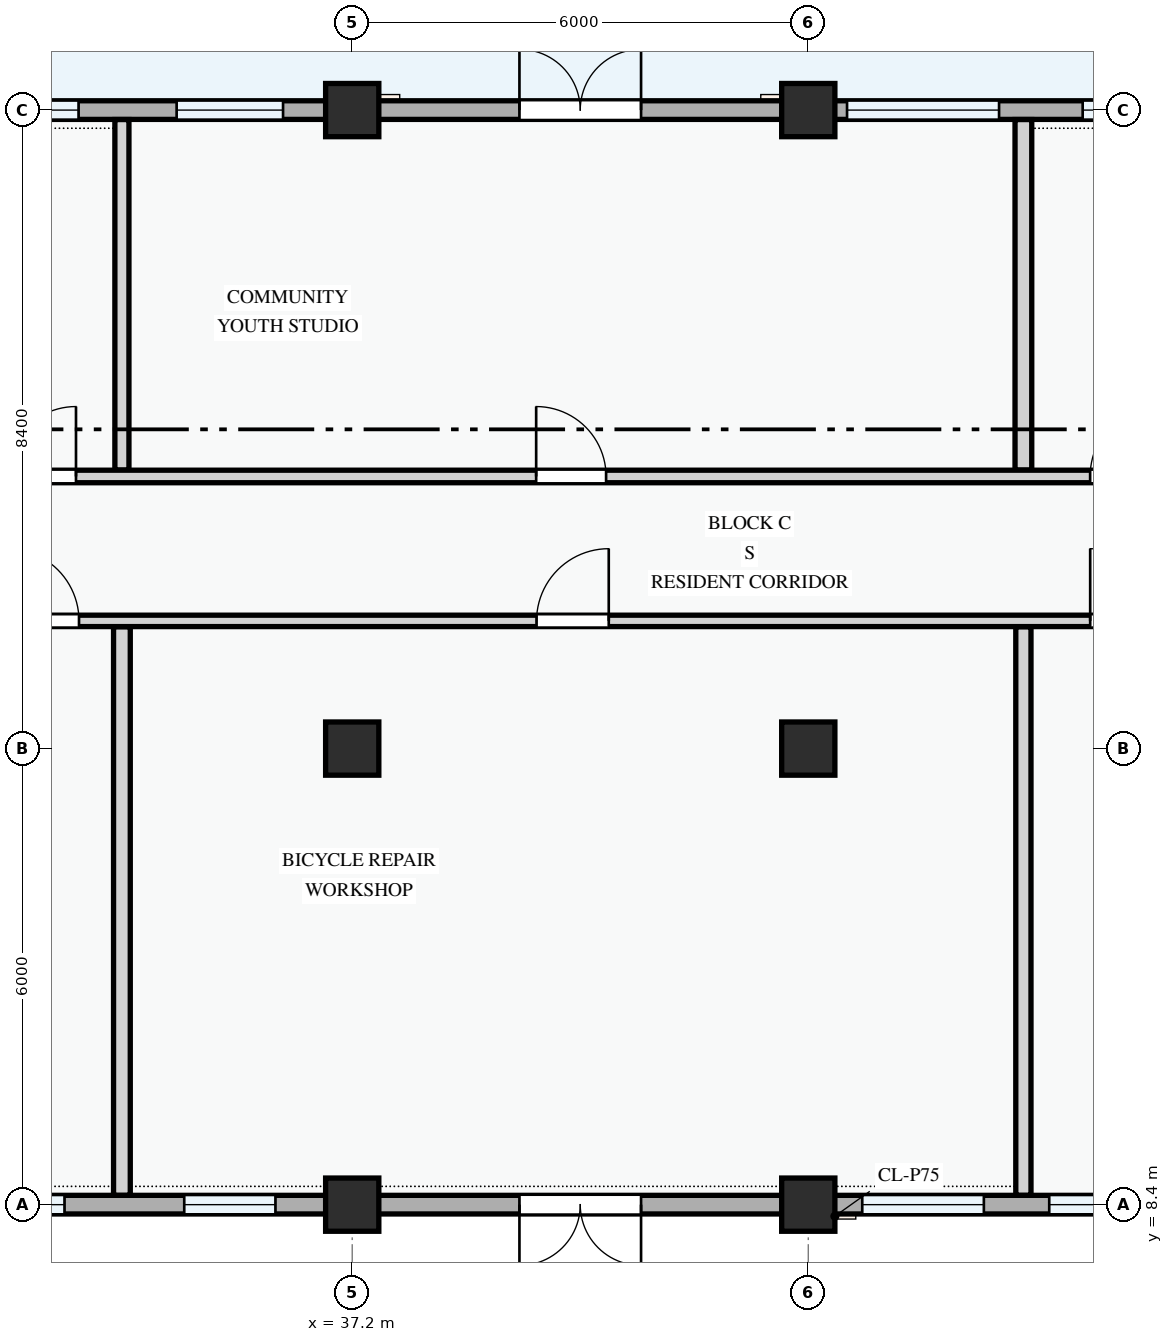
"""IFC4 building model, lengths in metres.
Left out: names, types, materials, properties, quantities, classifications, styles, units other than length and angle.
Written with IfcOpenShell. Run it as: python <this file> out.ifc"""

import sys

from ifc_helpers import new_model, si_unit, direction, frame, frame_2d, origin, origin_2d, place, context, subcontext, project, spatial, rectangle, extrude, element, fill, save


model = new_model("IFC4")
c1 = context("Model", 3, precision=1e-05, world=origin(), true_north=direction((0.0, 1.0)))
c2 = subcontext(c1, "Body", "Model", "MODEL_VIEW")
j1 = project(units=[si_unit("LENGTHUNIT", "METRE"), si_unit("PLANEANGLEUNIT", "RADIAN")], contexts=[c1])
p1 = place(None, origin())
s1 = spatial("IfcSite", under=j1, at=p1, CompositionType="ELEMENT")
p2 = place(p1, origin())
s2 = spatial("IfcBuilding", under=s1, at=p2, CompositionType="ELEMENT")
p3 = place(p2, origin())
s3 = spatial("IfcBuildingStorey", under=s2, at=p3, CompositionType="ELEMENT", Elevation=0.0)
for number, where, z_axis, x_axis in (
    (1, (37.2, 8.4, 0.0), (0.0, 0.0, 1.0), (1.0, 0.0, 0.0)),
    (2, (37.2, 14.4, 0.0), (0.0, 0.0, 1.0), (1.0, 0.0, 0.0)),
    (3, (37.2, 22.8, 0.0), (0.0, 0.0, 1.0), (1.0, 0.0, 0.0)),
    (4, (43.2, 8.4, 0.0), (0.0, 0.0, 1.0), (1.0, 0.0, 0.0)),
    (5, (43.2, 14.4, 0.0), (0.0, 0.0, 1.0), (1.0, 0.0, 0.0)),
    (6, (43.2, 22.8, 0.0), (0.0, 0.0, 1.0), (1.0, 0.0, 0.0)),
):
    element("IfcColumn", number, at=place(p3, frame(where, z_axis=z_axis, x_axis=x_axis)), inside=s3, PredefinedType="COLUMN", context=c2, shape_type="SweptSolid", body=[
        extrude(rectangle(XDim=0.7, YDim=0.7, at=origin_2d()), origin(), (0.0, 0.0, 1.0), 4.5),
    ])
p4 = place(p3, frame((28.8, 8.4, 0.0), z_axis=(0.0, 0.0, 1.0), x_axis=(1.0, 0.0, 0.0)))
e7 = element("IfcWall", 7, at=p4, inside=s3, PredefinedType="STANDARD", context=c2, shape_type="SweptSolid", body=[
    extrude(rectangle(XDim=8.4, YDim=0.245, at=frame_2d((4.2, 0.0))), origin(), (0.0, 0.0, 1.0), 3.485),
])
p5 = place(p4, frame((0.52, 0.0, 0.78)))
e8 = element("IfcOpeningElement", 8, at=p5, cuts=e7, PredefinedType="OPENING", context=c2, shape_type="SweptSolid", body=[
    extrude(rectangle(XDim=2.0, YDim=1.5, at=frame_2d((1.0, 0.75))), frame((0.0, 0.133, 0.0), z_axis=(0.0, -1.0, 0.0), x_axis=(1.0, 0.0, 0.0)), (0.0, 0.0, 1.0), 0.265),
])
p6 = place(p4, frame((3.465, 0.0, 0.78)))
e9 = element("IfcOpeningElement", 9, at=p6, cuts=e7, PredefinedType="OPENING", context=c2, shape_type="SweptSolid", body=[
    extrude(rectangle(XDim=1.15, YDim=1.25, at=frame_2d((0.575, 0.625))), frame((0.0, 0.133, 0.0), z_axis=(0.0, -1.0, 0.0), x_axis=(1.0, 0.0, 0.0)), (0.0, 0.0, 1.0), 0.265),
])
p7 = place(p4, frame((6.19, 0.0, 0.78)))
e10 = element("IfcOpeningElement", 10, at=p7, cuts=e7, PredefinedType="OPENING", context=c2, shape_type="SweptSolid", body=[
    extrude(rectangle(XDim=1.2, YDim=1.35, at=frame_2d((0.6, 0.675))), frame((0.0, 0.133, 0.0), z_axis=(0.0, -1.0, 0.0), x_axis=(1.0, 0.0, 0.0)), (0.0, 0.0, 1.0), 0.265),
])
p8 = place(p3, frame((37.2, 8.4, 0.0), z_axis=(0.0, 0.0, 1.0), x_axis=(1.0, 0.0, 0.0)))
e11 = element("IfcWall", 11, at=p8, inside=s3, PredefinedType="STANDARD", context=c2, shape_type="SweptSolid", body=[
    extrude(rectangle(XDim=6.0, YDim=0.245, at=frame_2d((3.0, 0.0))), origin(), (0.0, 0.0, 1.0), 3.585),
])
p9 = place(p8, frame((2.2, 0.0, 0.0)))
e12 = element("IfcOpeningElement", 12, at=p9, cuts=e11, PredefinedType="OPENING", context=c2, shape_type="SweptSolid", body=[
    extrude(rectangle(XDim=1.6, YDim=2.35, at=frame_2d((0.8, 1.175))), frame((0.0, 0.133, 0.0), z_axis=(0.0, -1.0, 0.0), x_axis=(1.0, 0.0, 0.0)), (0.0, 0.0, 1.0), 0.265),
])
p10 = place(p3, frame((43.2, 8.4, 0.0), z_axis=(0.0, 0.0, 1.0), x_axis=(1.0, 0.0, 0.0)))
e13 = element("IfcWall", 13, at=p10, inside=s3, PredefinedType="STANDARD", context=c2, shape_type="SweptSolid", body=[
    extrude(rectangle(XDim=8.4, YDim=0.245, at=frame_2d((4.2, 0.0))), origin(), (0.0, 0.0, 1.0), 3.485),
])
p11 = place(p10, frame((0.71, 0.0, 0.78)))
e14 = element("IfcOpeningElement", 14, at=p11, cuts=e13, PredefinedType="OPENING", context=c2, shape_type="SweptSolid", body=[
    extrude(rectangle(XDim=1.6, YDim=1.55, at=frame_2d((0.8, 0.775))), frame((0.0, 0.133, 0.0), z_axis=(0.0, -1.0, 0.0), x_axis=(1.0, 0.0, 0.0)), (0.0, 0.0, 1.0), 0.265),
])
p12 = place(p10, frame((3.17, 0.0, 0.78)))
e15 = element("IfcOpeningElement", 15, at=p12, cuts=e13, PredefinedType="OPENING", context=c2, shape_type="SweptSolid", body=[
    extrude(rectangle(XDim=2.08, YDim=1.52, at=frame_2d((1.04, 0.76))), frame((0.0, 0.133, 0.0), z_axis=(0.0, -1.0, 0.0), x_axis=(1.0, 0.0, 0.0)), (0.0, 0.0, 1.0), 0.265),
])
p13 = place(p10, frame((6.23, 0.0, 0.78)))
e16 = element("IfcOpeningElement", 16, at=p13, cuts=e13, PredefinedType="OPENING", context=c2, shape_type="SweptSolid", body=[
    extrude(rectangle(XDim=1.2, YDim=1.5, at=frame_2d((0.6, 0.75))), frame((0.0, 0.133, 0.0), z_axis=(0.0, -1.0, 0.0), x_axis=(1.0, 0.0, 0.0)), (0.0, 0.0, 1.0), 0.265),
])
p14 = place(p3, frame((51.6, 22.8, 0.0), z_axis=(0.0, 0.0, 1.0), x_axis=(-1.0, 0.0, 0.0)))
e17 = element("IfcWall", 17, at=p14, inside=s3, PredefinedType="STANDARD", context=c2, shape_type="SweptSolid", body=[
    extrude(rectangle(XDim=8.4, YDim=0.245, at=frame_2d((4.2, 0.0))), origin(), (0.0, 0.0, 1.0), 3.485),
])
p15 = place(p14, frame((0.53, 0.0, 0.78)))
e18 = element("IfcOpeningElement", 18, at=p15, cuts=e17, PredefinedType="OPENING", context=c2, shape_type="SweptSolid", body=[
    extrude(rectangle(XDim=2.08, YDim=1.52, at=frame_2d((1.04, 0.76))), frame((0.0, 0.133, 0.0), z_axis=(0.0, -1.0, 0.0), x_axis=(1.0, 0.0, 0.0)), (0.0, 0.0, 1.0), 0.265),
])
p16 = place(p14, frame((3.59, 0.0, 0.78)))
e19 = element("IfcOpeningElement", 19, at=p16, cuts=e17, PredefinedType="OPENING", context=c2, shape_type="SweptSolid", body=[
    extrude(rectangle(XDim=1.2, YDim=1.5, at=frame_2d((0.6, 0.75))), frame((0.0, 0.133, 0.0), z_axis=(0.0, -1.0, 0.0), x_axis=(1.0, 0.0, 0.0)), (0.0, 0.0, 1.0), 0.265),
])
p17 = place(p14, frame((5.89, 0.0, 0.78)))
e20 = element("IfcOpeningElement", 20, at=p17, cuts=e17, PredefinedType="OPENING", context=c2, shape_type="SweptSolid", body=[
    extrude(rectangle(XDim=2.0, YDim=1.5, at=frame_2d((1.0, 0.75))), frame((0.0, 0.133, 0.0), z_axis=(0.0, -1.0, 0.0), x_axis=(1.0, 0.0, 0.0)), (0.0, 0.0, 1.0), 0.265),
])
p18 = place(p3, frame((43.2, 22.8, 0.0), z_axis=(0.0, 0.0, 1.0), x_axis=(-1.0, 0.0, 0.0)))
e21 = element("IfcWall", 21, at=p18, inside=s3, PredefinedType="STANDARD", context=c2, shape_type="SweptSolid", body=[
    extrude(rectangle(XDim=6.0, YDim=0.245, at=frame_2d((3.0, 0.0))), origin(), (0.0, 0.0, 1.0), 3.585),
])
p19 = place(p18, frame((2.2, 0.0, 0.0)))
e22 = element("IfcOpeningElement", 22, at=p19, cuts=e21, PredefinedType="OPENING", context=c2, shape_type="SweptSolid", body=[
    extrude(rectangle(XDim=1.6, YDim=2.35, at=frame_2d((0.8, 1.175))), frame((0.0, 0.133, 0.0), z_axis=(0.0, -1.0, 0.0), x_axis=(1.0, 0.0, 0.0)), (0.0, 0.0, 1.0), 0.265),
])
p20 = place(p3, frame((37.2, 22.8, 0.0), z_axis=(0.0, 0.0, 1.0), x_axis=(-1.0, 0.0, 0.0)))
e23 = element("IfcWall", 23, at=p20, inside=s3, PredefinedType="STANDARD", context=c2, shape_type="SweptSolid", body=[
    extrude(rectangle(XDim=8.4, YDim=0.245, at=frame_2d((4.2, 0.0))), origin(), (0.0, 0.0, 1.0), 3.485),
])
p21 = place(p20, frame((0.91, 0.0, 0.78)))
e24 = element("IfcOpeningElement", 24, at=p21, cuts=e23, PredefinedType="OPENING", context=c2, shape_type="SweptSolid", body=[
    extrude(rectangle(XDim=1.4, YDim=1.45, at=frame_2d((0.7, 0.725))), frame((0.0, 0.133, 0.0), z_axis=(0.0, -1.0, 0.0), x_axis=(1.0, 0.0, 0.0)), (0.0, 0.0, 1.0), 0.265),
])
p22 = place(p20, frame((3.6, 0.0, 0.78)))
e25 = element("IfcOpeningElement", 25, at=p22, cuts=e23, PredefinedType="OPENING", context=c2, shape_type="SweptSolid", body=[
    extrude(rectangle(XDim=1.52, YDim=1.42, at=frame_2d((0.76, 0.71))), frame((0.0, 0.133, 0.0), z_axis=(0.0, -1.0, 0.0), x_axis=(1.0, 0.0, 0.0)), (0.0, 0.0, 1.0), 0.265),
])
p23 = place(p20, frame((5.94, 0.0, 0.78)))
e26 = element("IfcOpeningElement", 26, at=p23, cuts=e23, PredefinedType="OPENING", context=c2, shape_type="SweptSolid", body=[
    extrude(rectangle(XDim=1.88, YDim=1.52, at=frame_2d((0.94, 0.76))), frame((0.0, 0.133, 0.0), z_axis=(0.0, -1.0, 0.0), x_axis=(1.0, 0.0, 0.0)), (0.0, 0.0, 1.0), 0.265),
])
p24 = place(p3, frame((34.17, 8.524, 0.0), z_axis=(0.0, 0.0, 1.0), x_axis=(0.0, 1.0, 0.0)))
e27 = element("IfcWall", 27, at=p24, inside=s3, PredefinedType="PARTITIONING", context=c2, shape_type="SweptSolid", body=[
    extrude(rectangle(XDim=7.479, YDim=0.22, at=frame_2d((3.739, 0.0))), origin(), (0.0, 0.0, 1.0), 4.2),
])
p25 = place(p3, frame((34.17, 18.064, 0.0), z_axis=(0.0, 0.0, 1.0), x_axis=(0.0, 1.0, 0.0)))
e28 = element("IfcWall", 28, at=p25, inside=s3, PredefinedType="PARTITIONING", context=c2, shape_type="SweptSolid", body=[
    extrude(rectangle(XDim=4.611, YDim=0.185, at=frame_2d((2.306, 0.0))), origin(), (0.0, 0.0, 1.0), 4.2),
])
p26 = place(p3, frame((46.03, 8.524, 0.0), z_axis=(0.0, 0.0, 1.0), x_axis=(0.0, 1.0, 0.0)))
e29 = element("IfcWall", 29, at=p26, inside=s3, PredefinedType="PARTITIONING", context=c2, shape_type="SweptSolid", body=[
    extrude(rectangle(XDim=7.479, YDim=0.2, at=frame_2d((3.739, 0.0))), origin(), (0.0, 0.0, 1.0), 4.2),
])
p27 = place(p3, frame((46.03, 18.064, 0.0), z_axis=(0.0, 0.0, 1.0), x_axis=(0.0, 1.0, 0.0)))
e30 = element("IfcWall", 30, at=p27, inside=s3, PredefinedType="PARTITIONING", context=c2, shape_type="SweptSolid", body=[
    extrude(rectangle(XDim=4.611, YDim=0.22, at=frame_2d((2.306, 0.0))), origin(), (0.0, 0.0, 1.0), 4.2),
])
p28 = place(p3, frame((22.66, 16.08, 0.0), z_axis=(0.0, 0.0, 1.0), x_axis=(1.0, 0.0, 0.0)))
e31 = element("IfcWall", 31, at=p28, inside=s3, PredefinedType="PARTITIONING", context=c2, shape_type="SweptSolid", body=[
    extrude(rectangle(XDim=34.816, YDim=0.15, at=frame_2d((17.408, 0.0))), origin(), (0.0, 0.0, 1.0), 4.2),
])
p29 = place(p28, frame((9.996, 0.0, 0.0)))
e32 = element("IfcOpeningElement", 32, at=p29, cuts=e31, PredefinedType="OPENING", context=c2, shape_type="SweptSolid", body=[
    extrude(rectangle(XDim=0.95, YDim=2.1, at=frame_2d((0.475, 1.05))), frame((0.0, 0.085, 0.0), z_axis=(0.0, -1.0, 0.0), x_axis=(1.0, 0.0, 0.0)), (0.0, 0.0, 1.0), 0.17),
])
p30 = place(p28, frame((16.965, 0.0, 0.0)))
e33 = element("IfcOpeningElement", 33, at=p30, cuts=e31, PredefinedType="OPENING", context=c2, shape_type="SweptSolid", body=[
    extrude(rectangle(XDim=0.95, YDim=2.1, at=frame_2d((0.475, 1.05))), frame((0.0, 0.085, 0.0), z_axis=(0.0, -1.0, 0.0), x_axis=(1.0, 0.0, 0.0)), (0.0, 0.0, 1.0), 0.17),
])
p31 = place(p28, frame((24.249, 0.0, 0.0)))
e34 = element("IfcOpeningElement", 34, at=p31, cuts=e31, PredefinedType="OPENING", context=c2, shape_type="SweptSolid", body=[
    extrude(rectangle(XDim=0.95, YDim=2.1, at=frame_2d((0.475, 1.05))), frame((0.0, 0.085, 0.0), z_axis=(0.0, -1.0, 0.0), x_axis=(1.0, 0.0, 0.0)), (0.0, 0.0, 1.0), 0.17),
])
p32 = place(p3, frame((22.66, 17.98, 0.0), z_axis=(0.0, 0.0, 1.0), x_axis=(1.0, 0.0, 0.0)))
e35 = element("IfcWall", 35, at=p32, inside=s3, PredefinedType="PARTITIONING", context=c2, shape_type="SweptSolid", body=[
    extrude(rectangle(XDim=34.816, YDim=0.165, at=frame_2d((17.408, 0.0))), origin(), (0.0, 0.0, 1.0), 4.2),
])
p33 = place(p32, frame((9.986, 0.0, 0.0)))
e36 = element("IfcOpeningElement", 36, at=p33, cuts=e35, PredefinedType="OPENING", context=c2, shape_type="SweptSolid", body=[
    extrude(rectangle(XDim=0.92, YDim=2.1, at=frame_2d((0.46, 1.05))), frame((0.0, 0.093, 0.0), z_axis=(0.0, -1.0, 0.0), x_axis=(1.0, 0.0, 0.0)), (0.0, 0.0, 1.0), 0.185),
])
p34 = place(p32, frame((16.96, 0.0, 0.0)))
e37 = element("IfcOpeningElement", 37, at=p34, cuts=e35, PredefinedType="OPENING", context=c2, shape_type="SweptSolid", body=[
    extrude(rectangle(XDim=0.92, YDim=2.1, at=frame_2d((0.46, 1.05))), frame((0.0, 0.093, 0.0), z_axis=(0.0, -1.0, 0.0), x_axis=(1.0, 0.0, 0.0)), (0.0, 0.0, 1.0), 0.185),
])
p35 = place(p32, frame((24.248, 0.0, 0.0)))
e38 = element("IfcOpeningElement", 38, at=p35, cuts=e35, PredefinedType="OPENING", context=c2, shape_type="SweptSolid", body=[
    extrude(rectangle(XDim=0.96, YDim=2.12, at=frame_2d((0.48, 1.06))), frame((0.0, 0.093, 0.0), z_axis=(0.0, -1.0, 0.0), x_axis=(1.0, 0.0, 0.0)), (0.0, 0.0, 1.0), 0.185),
])
p36 = place(p6, origin())
e39 = element("IfcWindow", 39, at=p36, inside=s3, PartitioningType="SINGLE_PANEL", PredefinedType="WINDOW", context=c2, shape_type="SweptSolid", body=[
    extrude(rectangle(XDim=1.15, YDim=1.25, at=frame_2d((0.575, 0.625))), frame((0.0, 0.03, 0.0), z_axis=(0.0, -1.0, 0.0), x_axis=(1.0, 0.0, 0.0)), (0.0, 0.0, 1.0), 0.06),
])
fill(e9, e39)
p37 = place(p7, origin())
e40 = element("IfcWindow", 40, at=p37, inside=s3, PartitioningType="SINGLE_PANEL", PredefinedType="WINDOW", context=c2, shape_type="SweptSolid", body=[
    extrude(rectangle(XDim=1.2, YDim=1.35, at=frame_2d((0.6, 0.675))), frame((0.0, 0.03, 0.0), z_axis=(0.0, -1.0, 0.0), x_axis=(1.0, 0.0, 0.0)), (0.0, 0.0, 1.0), 0.06),
])
fill(e10, e40)
p38 = place(p9, frame((1.6, 0.0, 0.0), z_axis=(0.0, 0.0, 1.0), x_axis=(-1.0, 0.0, 0.0)))
e41 = element("IfcDoor", 41, at=p38, inside=s3, OperationType="DOUBLE_DOOR_SINGLE_SWING", PredefinedType="DOOR", context=c2, shape_type="SweptSolid", body=[
    extrude(rectangle(XDim=1.6, YDim=2.35, at=frame_2d((0.8, 1.175))), frame((0.0, 0.025, 0.0), z_axis=(0.0, -1.0, 0.0), x_axis=(1.0, 0.0, 0.0)), (0.0, 0.0, 1.0), 0.05),
])
fill(e12, e41)
p39 = place(p11, origin())
e42 = element("IfcWindow", 42, at=p39, inside=s3, PartitioningType="DOUBLE_PANEL_VERTICAL", PredefinedType="WINDOW", context=c2, shape_type="SweptSolid", body=[
    extrude(rectangle(XDim=1.6, YDim=1.55, at=frame_2d((0.8, 0.775))), frame((0.0, 0.03, 0.0), z_axis=(0.0, -1.0, 0.0), x_axis=(1.0, 0.0, 0.0)), (0.0, 0.0, 1.0), 0.06),
])
fill(e14, e42)
p40 = place(p12, origin())
e43 = element("IfcWindow", 43, at=p40, inside=s3, PartitioningType="DOUBLE_PANEL_VERTICAL", PredefinedType="WINDOW", context=c2, shape_type="SweptSolid", body=[
    extrude(rectangle(XDim=2.08, YDim=1.52, at=frame_2d((1.04, 0.76))), frame((0.0, 0.03, 0.0), z_axis=(0.0, -1.0, 0.0), x_axis=(1.0, 0.0, 0.0)), (0.0, 0.0, 1.0), 0.06),
])
fill(e15, e43)
p41 = place(p16, origin())
e44 = element("IfcWindow", 44, at=p41, inside=s3, PartitioningType="SINGLE_PANEL", PredefinedType="WINDOW", context=c2, shape_type="SweptSolid", body=[
    extrude(rectangle(XDim=1.2, YDim=1.5, at=frame_2d((0.6, 0.75))), frame((0.0, 0.03, 0.0), z_axis=(0.0, -1.0, 0.0), x_axis=(1.0, 0.0, 0.0)), (0.0, 0.0, 1.0), 0.06),
])
fill(e19, e44)
p42 = place(p17, origin())
e45 = element("IfcWindow", 45, at=p42, inside=s3, PartitioningType="DOUBLE_PANEL_VERTICAL", PredefinedType="WINDOW", context=c2, shape_type="SweptSolid", body=[
    extrude(rectangle(XDim=2.0, YDim=1.5, at=frame_2d((1.0, 0.75))), frame((0.0, 0.03, 0.0), z_axis=(0.0, -1.0, 0.0), x_axis=(1.0, 0.0, 0.0)), (0.0, 0.0, 1.0), 0.06),
])
fill(e20, e45)
p43 = place(p19, frame((1.6, 0.0, 0.0), z_axis=(0.0, 0.0, 1.0), x_axis=(-1.0, 0.0, 0.0)))
e46 = element("IfcDoor", 46, at=p43, inside=s3, OperationType="DOUBLE_DOOR_SINGLE_SWING", PredefinedType="DOOR", context=c2, shape_type="SweptSolid", body=[
    extrude(rectangle(XDim=1.6, YDim=2.35, at=frame_2d((0.8, 1.175))), frame((0.0, 0.025, 0.0), z_axis=(0.0, -1.0, 0.0), x_axis=(1.0, 0.0, 0.0)), (0.0, 0.0, 1.0), 0.05),
])
fill(e22, e46)
p44 = place(p21, origin())
e47 = element("IfcWindow", 47, at=p44, inside=s3, PartitioningType="SINGLE_PANEL", PredefinedType="WINDOW", context=c2, shape_type="SweptSolid", body=[
    extrude(rectangle(XDim=1.4, YDim=1.45, at=frame_2d((0.7, 0.725))), frame((0.0, 0.03, 0.0), z_axis=(0.0, -1.0, 0.0), x_axis=(1.0, 0.0, 0.0)), (0.0, 0.0, 1.0), 0.06),
])
fill(e24, e47)
p45 = place(p22, origin())
e48 = element("IfcWindow", 48, at=p45, inside=s3, PartitioningType="SINGLE_PANEL", PredefinedType="WINDOW", context=c2, shape_type="SweptSolid", body=[
    extrude(rectangle(XDim=1.52, YDim=1.42, at=frame_2d((0.76, 0.71))), frame((0.0, 0.03, 0.0), z_axis=(0.0, -1.0, 0.0), x_axis=(1.0, 0.0, 0.0)), (0.0, 0.0, 1.0), 0.06),
])
fill(e25, e48)
p46 = place(p29, origin())
e49 = element("IfcDoor", 49, at=p46, inside=s3, OperationType="SINGLE_SWING_LEFT", PredefinedType="DOOR", context=c2, shape_type="SweptSolid", body=[
    extrude(rectangle(XDim=0.95, YDim=2.1, at=frame_2d((0.475, 1.05))), frame((0.0, 0.025, 0.0), z_axis=(0.0, -1.0, 0.0), x_axis=(1.0, 0.0, 0.0)), (0.0, 0.0, 1.0), 0.05),
])
fill(e32, e49)
p47 = place(p30, origin())
e50 = element("IfcDoor", 50, at=p47, inside=s3, OperationType="SINGLE_SWING_RIGHT", PredefinedType="DOOR", context=c2, shape_type="SweptSolid", body=[
    extrude(rectangle(XDim=0.95, YDim=2.1, at=frame_2d((0.475, 1.05))), frame((0.0, 0.025, 0.0), z_axis=(0.0, -1.0, 0.0), x_axis=(1.0, 0.0, 0.0)), (0.0, 0.0, 1.0), 0.05),
])
fill(e33, e50)
p48 = place(p31, origin())
e51 = element("IfcDoor", 51, at=p48, inside=s3, OperationType="SINGLE_SWING_LEFT", PredefinedType="DOOR", context=c2, shape_type="SweptSolid", body=[
    extrude(rectangle(XDim=0.95, YDim=2.1, at=frame_2d((0.475, 1.05))), frame((0.0, 0.025, 0.0), z_axis=(0.0, -1.0, 0.0), x_axis=(1.0, 0.0, 0.0)), (0.0, 0.0, 1.0), 0.05),
])
fill(e34, e51)
p49 = place(p33, origin())
e52 = element("IfcDoor", 52, at=p49, inside=s3, OperationType="SINGLE_SWING_RIGHT", PredefinedType="DOOR", context=c2, shape_type="SweptSolid", body=[
    extrude(rectangle(XDim=0.92, YDim=2.1, at=frame_2d((0.46, 1.05))), frame((0.0, 0.025, 0.0), z_axis=(0.0, -1.0, 0.0), x_axis=(1.0, 0.0, 0.0)), (0.0, 0.0, 1.0), 0.05),
])
fill(e36, e52)
p50 = place(p34, origin())
e53 = element("IfcDoor", 53, at=p50, inside=s3, OperationType="SINGLE_SWING_LEFT", PredefinedType="DOOR", context=c2, shape_type="SweptSolid", body=[
    extrude(rectangle(XDim=0.92, YDim=2.1, at=frame_2d((0.46, 1.05))), frame((0.0, 0.025, 0.0), z_axis=(0.0, -1.0, 0.0), x_axis=(1.0, 0.0, 0.0)), (0.0, 0.0, 1.0), 0.05),
])
fill(e37, e53)
p51 = place(p35, origin())
e54 = element("IfcDoor", 54, at=p51, inside=s3, OperationType="SINGLE_SWING_RIGHT", PredefinedType="DOOR", context=c2, shape_type="SweptSolid", body=[
    extrude(rectangle(XDim=0.96, YDim=2.12, at=frame_2d((0.48, 1.06))), frame((0.0, 0.025, 0.0), z_axis=(0.0, -1.0, 0.0), x_axis=(1.0, 0.0, 0.0)), (0.0, 0.0, 1.0), 0.05),
])
fill(e38, e54)
save(model, sys.argv[1])
